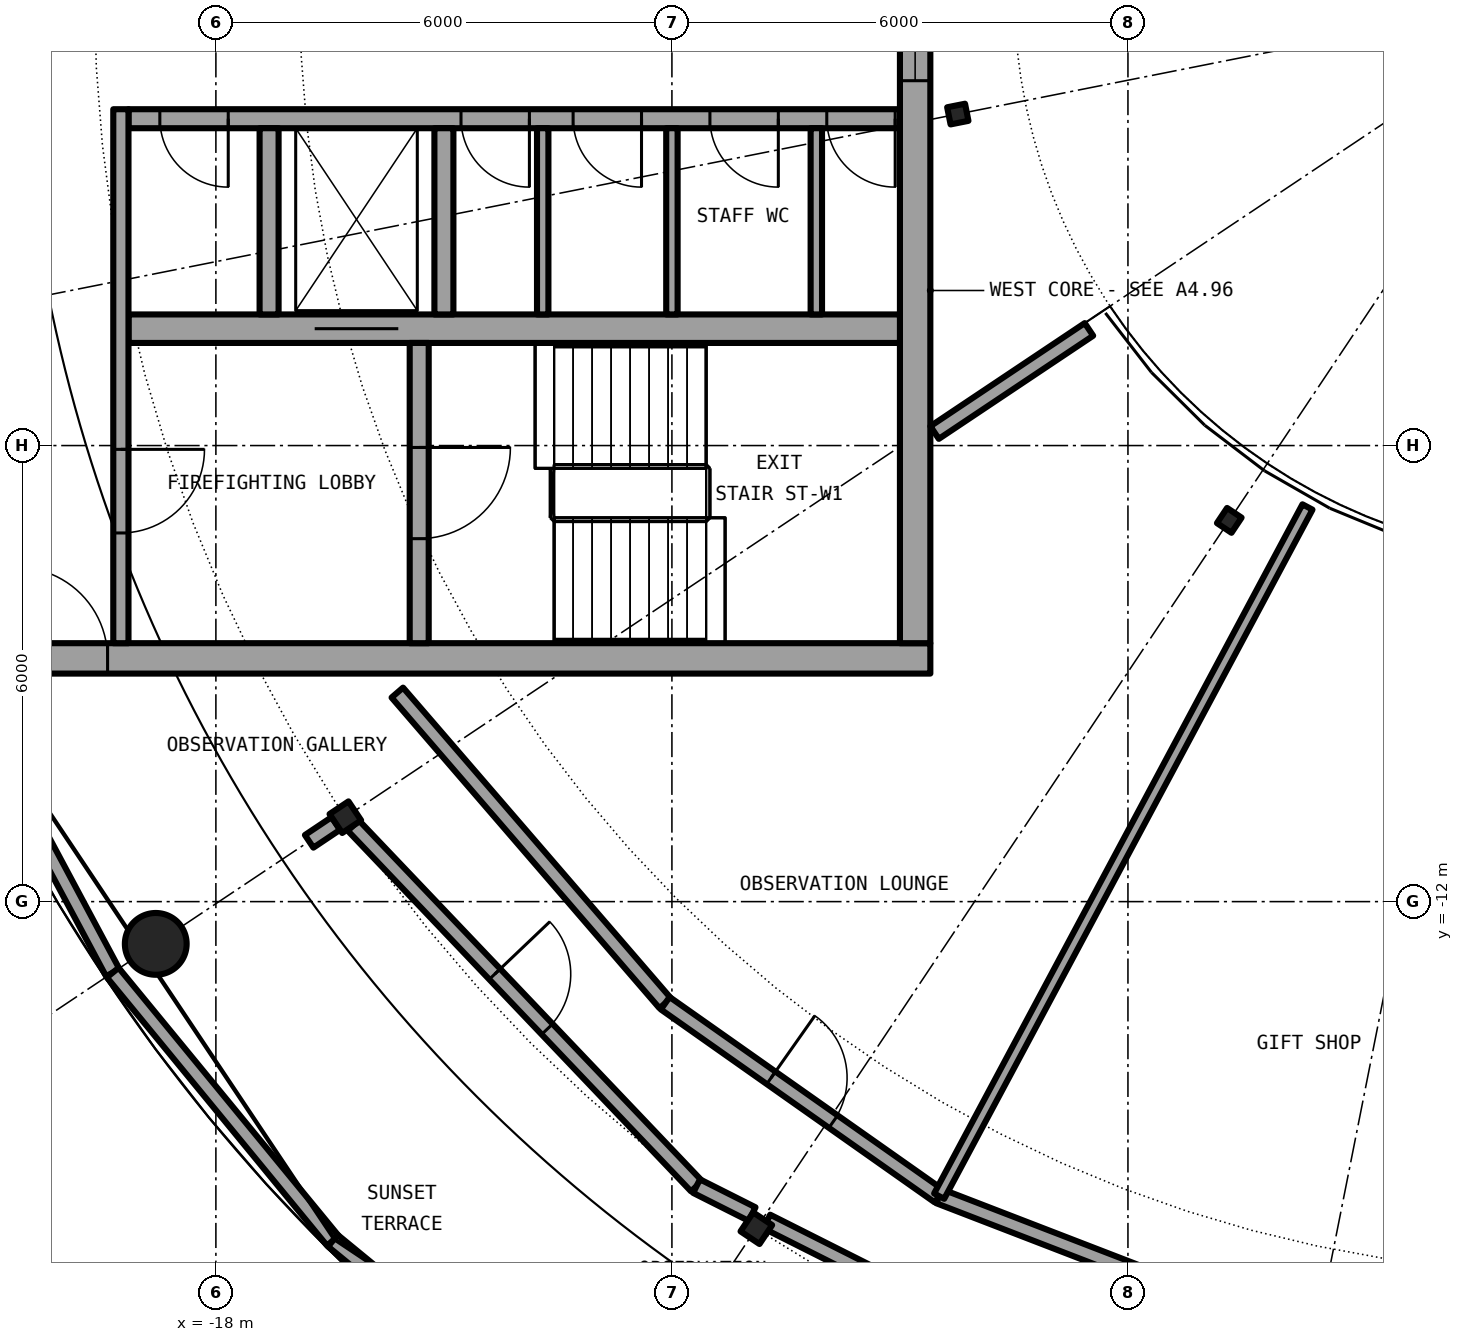
"""IFC4 building model, lengths in metres.
Left out: names, types, materials, properties, quantities, classifications, styles, units other than length and angle.
Written with IfcOpenShell. Run it as: python <this file> out.ifc"""

import sys

from ifc_helpers import new_model, si_unit, direction, frame, frame_2d, origin, origin_2d, place, context, subcontext, project, spatial, rectangle, hollow_circle, i_section, extrude, element, fill, save


model = new_model("IFC4")
c1 = context("Model", 3, precision=1e-05, world=origin(), true_north=direction((0.0, 1.0)))
c2 = subcontext(c1, "Body", "Model", "MODEL_VIEW")
j1 = project(units=[si_unit("LENGTHUNIT", "METRE"), si_unit("PLANEANGLEUNIT", "RADIAN")], contexts=[c1])
p1 = place(None, origin())
s1 = spatial("IfcSite", under=j1, at=p1, CompositionType="ELEMENT")
p2 = place(p1, origin())
s2 = spatial("IfcBuilding", under=s1, at=p2, CompositionType="ELEMENT")
p3 = place(p2, frame((0.0, 0.0, 255.4)))
s3 = spatial("IfcBuildingStorey", under=s2, at=p3, CompositionType="ELEMENT", Elevation=255.4)
p4 = place(p3, frame((-18.791, -12.556, 0.0), z_axis=(0.0, 0.0, 1.0), x_axis=(1.0, 0.0, 0.0)))
e1 = element("IfcColumn", 1, at=p4, inside=s3, PredefinedType="COLUMN", context=c2, shape_type="SweptSolid", body=[
    extrude(hollow_circle(Radius=0.406, WallThickness=0.03, at=origin_2d()), origin(), (0.0, 0.0, 1.0), 6.1),
])
for number, where, z_axis, x_axis in (
    (2, (-16.297, -10.889, 0.0), (0.0, 0.0, 1.0), (-0.831, -0.556, 0.0)),
    (3, (-10.889, -16.297, 0.0), (0.0, 0.0, 1.0), (-0.556, -0.831, 0.0)),
):
    element("IfcColumn", number, at=place(p3, frame(where, z_axis=z_axis, x_axis=x_axis)), inside=s3, PredefinedType="COLUMN", context=c2, shape_type="SweptSolid", body=[
        extrude(i_section(OverallWidth=0.3, OverallDepth=0.3, WebThickness=0.011, FlangeThickness=0.019, FilletRadius=0.027, at=origin_2d()), origin(), (0.0, 0.0, 1.0), 6.1),
    ])
for number, where, z_axis, x_axis in (
    (4, (-8.239, -1.639, 0.0), (0.0, 0.0, 1.0), (-0.981, -0.195, 0.0)),
    (5, (-4.667, -6.984, 0.0), (0.0, 0.0, 1.0), (-0.556, -0.831, 0.0)),
):
    element("IfcColumn", number, at=place(p3, frame(where, z_axis=z_axis, x_axis=x_axis)), inside=s3, PredefinedType="COLUMN", context=c2, shape_type="SweptSolid", body=[
        extrude(i_section(OverallWidth=0.24, OverallDepth=0.23, WebThickness=0.008, FlangeThickness=0.012, FilletRadius=0.021, at=origin_2d()), origin(), (0.0, 0.0, 1.0), 6.1),
    ])
p5 = place(p3, frame((-21.508, -8.909, 6.1), z_axis=(0.0, 0.0, 1.0), x_axis=(0.471334945511, -0.881954289711, 0.0)))
e6 = element("IfcWall", 6, at=p5, inside=s3, PredefinedType="PARAPET", context=c2, shape_type="SweptSolid", body=[
    extrude(rectangle(XDim=4.564, YDim=0.2, at=frame_2d((2.282, 0.0))), origin(), (0.0, 0.0, 1.0), 1.1),
])
for number, where, z_axis, x_axis in (
    (7, (-19.357, -12.934, 6.1), (0.0, 0.0, 1.0), (0.635, -0.773, 0.0)),
    (8, (-16.461, -16.461, 6.1), (0.0, 0.0, 1.0), (0.773, -0.635, 0.0)),
):
    element("IfcWall", number, at=place(p3, frame(where, z_axis=z_axis, x_axis=x_axis)), inside=s3, PredefinedType="PARAPET", context=c2, shape_type="SweptSolid", body=[
        extrude(rectangle(XDim=4.563, YDim=0.2, at=frame_2d((2.282, 0.0))), origin(), (0.0, 0.0, 1.0), 1.1),
    ])
p6 = place(p3, frame((-21.1, -8.8, 0.0), z_axis=(0.0, 0.0, 1.0), x_axis=(1.0, 0.0, 0.0)))
e9 = element("IfcWall", 9, at=p6, inside=s3, PredefinedType="SHEAR", context=c2, shape_type="SweptSolid", body=[
    extrude(rectangle(XDim=12.5, YDim=0.4, at=frame_2d((6.25, 0.0))), origin(), (0.0, 0.0, 1.0), 6.1),
])
p7 = place(p6, frame((0.475, 0.0, 0.0)))
e10 = element("IfcOpeningElement", 10, at=p7, cuts=e9, PredefinedType="OPENING", context=c2, shape_type="SweptSolid", body=[
    extrude(rectangle(XDim=1.2, YDim=2.3, at=frame_2d((0.6, 1.15))), frame((0.0, 0.21, 0.0), z_axis=(0.0, -1.0, 0.0), x_axis=(1.0, 0.0, 0.0)), (0.0, 0.0, 1.0), 0.42),
])
p8 = place(p3, frame((-8.8, 8.6, 0.0), z_axis=(0.0, 0.0, 1.0), x_axis=(0.0, -1.0, 0.0)))
e11 = element("IfcWall", 11, at=p8, inside=s3, PredefinedType="SHEAR", context=c2, shape_type="SweptSolid", body=[
    extrude(rectangle(XDim=17.2, YDim=0.4, at=frame_2d((8.6, 0.0))), origin(), (0.0, 0.0, 1.0), 6.1),
])
p9 = place(p8, frame((7.4, 0.0, 0.1)))
e12 = element("IfcOpeningElement", 12, at=p9, cuts=e11, PredefinedType="OPENING", context=c2, shape_type="SweptSolid", body=[
    extrude(rectangle(XDim=2.4, YDim=2.2, at=frame_2d((1.2, 1.1))), frame((0.0, 0.21, 0.0), z_axis=(0.0, -1.0, 0.0), x_axis=(1.0, 0.0, 0.0)), (0.0, 0.0, 1.0), 0.42),
])
p10 = place(p3, frame((-9.0, -1.7, 0.0), z_axis=(0.0, 0.0, 1.0), x_axis=(-1.0, 0.0, 0.0)))
e13 = element("IfcWall", 13, at=p10, inside=s3, PredefinedType="SHEAR", context=c2, shape_type="SweptSolid", body=[
    extrude(rectangle(XDim=10.15, YDim=0.25, at=frame_2d((5.075, 0.0))), origin(), (0.0, 0.0, 1.0), 6.1),
])
p11 = place(p10, frame((0.062, 0.0, 0.0)))
e14 = element("IfcOpeningElement", 14, at=p11, cuts=e13, PredefinedType="OPENING", context=c2, shape_type="SweptSolid", body=[
    extrude(rectangle(XDim=0.9, YDim=2.3, at=frame_2d((0.45, 1.15))), frame((0.0, 0.135, 0.0), z_axis=(0.0, -1.0, 0.0), x_axis=(1.0, 0.0, 0.0)), (0.0, 0.0, 1.0), 0.27),
])
p12 = place(p10, frame((1.6, 0.0, 0.0)))
e15 = element("IfcOpeningElement", 15, at=p12, cuts=e13, PredefinedType="OPENING", context=c2, shape_type="SweptSolid", body=[
    extrude(rectangle(XDim=0.9, YDim=2.3, at=frame_2d((0.45, 1.15))), frame((0.0, 0.135, 0.0), z_axis=(0.0, -1.0, 0.0), x_axis=(1.0, 0.0, 0.0)), (0.0, 0.0, 1.0), 0.27),
])
p13 = place(p10, frame((3.4, 0.0, 0.0)))
e16 = element("IfcOpeningElement", 16, at=p13, cuts=e13, PredefinedType="OPENING", context=c2, shape_type="SweptSolid", body=[
    extrude(rectangle(XDim=0.9, YDim=2.3, at=frame_2d((0.45, 1.15))), frame((0.0, 0.135, 0.0), z_axis=(0.0, -1.0, 0.0), x_axis=(1.0, 0.0, 0.0)), (0.0, 0.0, 1.0), 0.27),
])
p14 = place(p10, frame((4.875, 0.0, 0.0)))
e17 = element("IfcOpeningElement", 17, at=p14, cuts=e13, PredefinedType="OPENING", context=c2, shape_type="SweptSolid", body=[
    extrude(rectangle(XDim=0.9, YDim=2.3, at=frame_2d((0.45, 1.15))), frame((0.0, 0.135, 0.0), z_axis=(0.0, -1.0, 0.0), x_axis=(1.0, 0.0, 0.0)), (0.0, 0.0, 1.0), 0.27),
])
p15 = place(p10, frame((8.837, 0.0, 0.0)))
e18 = element("IfcOpeningElement", 18, at=p15, cuts=e13, PredefinedType="OPENING", context=c2, shape_type="SweptSolid", body=[
    extrude(rectangle(XDim=0.9, YDim=2.3, at=frame_2d((0.45, 1.15))), frame((0.0, 0.135, 0.0), z_axis=(0.0, -1.0, 0.0), x_axis=(1.0, 0.0, 0.0)), (0.0, 0.0, 1.0), 0.27),
])
p16 = place(p3, frame((-9.0, -4.462, 0.0), z_axis=(0.0, 0.0, 1.0), x_axis=(-1.0, 0.0, 0.0)))
e19 = element("IfcWall", 19, at=p16, inside=s3, PredefinedType="SHEAR", context=c2, shape_type="SweptSolid", body=[
    extrude(rectangle(XDim=10.15, YDim=0.375, at=frame_2d((5.075, 0.0))), origin(), (0.0, 0.0, 1.0), 6.1),
])
p17 = place(p16, frame((6.6, 0.0, 0.0)))
e20 = element("IfcOpeningElement", 20, at=p17, cuts=e19, PredefinedType="OPENING", context=c2, shape_type="SweptSolid", body=[
    extrude(rectangle(XDim=1.1, YDim=2.3, at=frame_2d((0.55, 1.15))), frame((0.0, 0.198, 0.0), z_axis=(0.0, -1.0, 0.0), x_axis=(1.0, 0.0, 0.0)), (0.0, 0.0, 1.0), 0.395),
])
p18 = place(p3, frame((-15.325, -4.65, 0.0), z_axis=(0.0, 0.0, 1.0), x_axis=(0.0, -1.0, 0.0)))
e21 = element("IfcWall", 21, at=p18, inside=s3, PredefinedType="SHEAR", context=c2, shape_type="SweptSolid", body=[
    extrude(rectangle(XDim=3.95, YDim=0.25, at=frame_2d((1.975, 0.0))), origin(), (0.0, 0.0, 1.0), 6.1),
])
p19 = place(p18, frame((1.375, 0.0, 0.0)))
e22 = element("IfcOpeningElement", 22, at=p19, cuts=e21, PredefinedType="OPENING", context=c2, shape_type="SweptSolid", body=[
    extrude(rectangle(XDim=1.2, YDim=2.3, at=frame_2d((0.6, 1.15))), frame((0.0, 0.135, 0.0), z_axis=(0.0, -1.0, 0.0), x_axis=(1.0, 0.0, 0.0)), (0.0, 0.0, 1.0), 0.27),
])
for number, where, z_axis, x_axis in (
    (23, (-15.0, -1.825, 0.0), (0.0, 0.0, 1.0), (0.0, -1.0, 0.0)),
    (24, (-17.3, -1.825, 0.0), (0.0, 0.0, 1.0), (0.0, -1.0, 0.0)),
):
    element("IfcWall", number, at=place(p3, frame(where, z_axis=z_axis, x_axis=x_axis)), inside=s3, PredefinedType="SOLIDWALL", context=c2, shape_type="SweptSolid", body=[
        extrude(rectangle(XDim=2.45, YDim=0.25, at=frame_2d((1.225, 0.0))), origin(), (0.0, 0.0, 1.0), 5.75),
    ])
p20 = place(p3, frame((-19.25, -1.575, 0.0), z_axis=(0.0, 0.0, 1.0), x_axis=(0.0, -1.0, 0.0)))
e25 = element("IfcWall", 25, at=p20, inside=s3, PredefinedType="SOLIDWALL", context=c2, shape_type="SweptSolid", body=[
    extrude(rectangle(XDim=7.025, YDim=0.2, at=frame_2d((3.513, 0.0))), origin(), (0.0, 0.0, 1.0), 5.75),
])
p21 = place(p20, frame((4.475, 0.0, 0.0)))
e26 = element("IfcOpeningElement", 26, at=p21, cuts=e25, PredefinedType="OPENING", context=c2, shape_type="SweptSolid", body=[
    extrude(rectangle(XDim=1.1, YDim=2.3, at=frame_2d((0.55, 1.15))), frame((0.0, 0.11, 0.0), z_axis=(0.0, -1.0, 0.0), x_axis=(1.0, 0.0, 0.0)), (0.0, 0.0, 1.0), 0.22),
])
for number, where, z_axis, x_axis in (
    (27, (-10.1, -1.825, 0.0), (0.0, 0.0, 1.0), (0.0, -1.0, 0.0)),
    (28, (-12.0, -1.825, 0.0), (0.0, 0.0, 1.0), (0.0, -1.0, 0.0)),
    (29, (-13.7, -1.825, 0.0), (0.0, 0.0, 1.0), (0.0, -1.0, 0.0)),
):
    element("IfcWall", number, at=place(p3, frame(where, z_axis=z_axis, x_axis=x_axis)), inside=s3, PredefinedType="PARTITIONING", context=c2, shape_type="SweptSolid", body=[
        extrude(rectangle(XDim=2.45, YDim=0.15, at=frame_2d((1.225, 0.0))), origin(), (0.0, 0.0, 1.0), 5.75),
    ])
p22 = place(p3, frame((-16.192, -10.999, 0.0), z_axis=(0.0, 0.0, 1.0), x_axis=(0.689484820725, -0.724300132535, 0.0)))
e30 = element("IfcWall", 30, at=p22, inside=s3, PredefinedType="PARTITIONING", context=c2, shape_type="SweptSolid", body=[
    extrude(rectangle(XDim=6.55, YDim=0.2, at=frame_2d((3.275, 0.0))), origin(), (0.0, 0.0, 1.0), 5.5),
])
p23 = place(p22, frame((2.699, 0.0, 0.0)))
e31 = element("IfcOpeningElement", 31, at=p23, cuts=e30, PredefinedType="OPENING", context=c2, shape_type="SweptSolid", body=[
    extrude(rectangle(XDim=1.0, YDim=2.3, at=frame_2d((0.5, 1.15))), frame((0.0, 0.11, 0.0), z_axis=(0.0, -1.0, 0.0), x_axis=(1.0, 0.0, 0.0)), (0.0, 0.0, 1.0), 0.22),
])
p24 = place(p3, frame((-11.676, -15.743, 0.0), z_axis=(0.0, 0.0, 1.0), x_axis=(0.893110817984, -0.449836711263, 0.0)))
e32 = element("IfcWall", 32, at=p24, inside=s3, PredefinedType="PARTITIONING", context=c2, shape_type="SweptSolid", body=[
    extrude(rectangle(XDim=0.818, YDim=0.2, at=frame_2d((0.409, 0.0))), origin(), (0.0, 0.0, 1.0), 5.75),
])
p25 = place(p3, frame((-10.752, -16.208, 0.0), z_axis=(0.0, 0.0, 1.0), x_axis=(0.89321770158, -0.449624440599, 0.0)))
e33 = element("IfcWall", 33, at=p25, inside=s3, PredefinedType="PARTITIONING", context=c2, shape_type="SweptSolid", body=[
    extrude(rectangle(XDim=5.667, YDim=0.2, at=frame_2d((2.833, 0.0))), origin(), (0.0, 0.0, 1.0), 5.5),
])
p26 = place(p3, frame((-8.485, -15.875, 0.0), z_axis=(0.0, 0.0, 1.0), x_axis=(0.932983851272, -0.35991823136, 0.0)))
e34 = element("IfcWall", 34, at=p26, inside=s3, PredefinedType="PARTITIONING", context=c2, shape_type="SweptSolid", body=[
    extrude(rectangle(XDim=4.406, YDim=0.2, at=frame_2d((2.203, 0.0))), origin(), (0.0, 0.0, 1.0), 5.75),
])
p27 = place(p3, frame((-15.613, -9.25, 0.0), z_axis=(0.0, 0.0, 1.0), x_axis=(0.653146301984, -0.757231740093, 0.0)))
e35 = element("IfcWall", 35, at=p27, inside=s3, PredefinedType="PARTITIONING", context=c2, shape_type="SweptSolid", body=[
    extrude(rectangle(XDim=5.397, YDim=0.2, at=frame_2d((2.699, 0.0))), origin(), (0.0, 0.0, 1.0), 5.75),
])
p28 = place(p3, frame((-12.088, -13.337, 0.0), z_axis=(0.0, 0.0, 1.0), x_axis=(0.817507922666, -0.575917352038, 0.0)))
e36 = element("IfcWall", 36, at=p28, inside=s3, PredefinedType="PARTITIONING", context=c2, shape_type="SweptSolid", body=[
    extrude(rectangle(XDim=4.407, YDim=0.2, at=frame_2d((2.204, 0.0))), origin(), (0.0, 0.0, 1.0), 5.75),
])
p29 = place(p28, frame((1.704, 0.0, 0.0)))
e37 = element("IfcOpeningElement", 37, at=p29, cuts=e36, PredefinedType="OPENING", context=c2, shape_type="SweptSolid", body=[
    extrude(rectangle(XDim=1.0, YDim=2.3, at=frame_2d((0.5, 1.15))), frame((0.0, 0.11, 0.0), z_axis=(0.0, -1.0, 0.0), x_axis=(1.0, 0.0, 0.0)), (0.0, 0.0, 1.0), 0.22),
])
p30 = place(p3, frame((-6.513, -4.472, 0.0), z_axis=(0.0, 0.0, 1.0), x_axis=(-0.831450132577, -0.555599385382, 0.0)))
e38 = element("IfcWall", 38, at=p30, inside=s3, PredefinedType="PARTITIONING", context=c2, shape_type="SweptSolid", body=[
    extrude(rectangle(XDim=2.443, YDim=0.2, at=frame_2d((1.221, 0.0))), origin(), (0.0, 0.0, 1.0), 5.75),
])
p31 = place(p3, frame((-16.773, -11.207, 0.0), z_axis=(0.0, 0.0, 1.0), x_axis=(0.830713836596, 0.556699669201, 0.0)))
e39 = element("IfcWall", 39, at=p31, inside=s3, PredefinedType="PARTITIONING", context=c2, shape_type="SweptSolid", body=[
    extrude(rectangle(XDim=0.422, YDim=0.2, at=frame_2d((0.211, 0.0))), origin(), (0.0, 0.0, 1.0), 5.75),
])
p32 = place(p3, frame((-8.484, -15.875, 0.0), z_axis=(0.0, 0.0, 1.0), x_axis=(0.471365806418, 0.881937796299, 0.0)))
e40 = element("IfcWall", 40, at=p32, inside=s3, PredefinedType="PARTITIONING", context=c2, shape_type="SweptSolid", body=[
    extrude(rectangle(XDim=10.281, YDim=0.15, at=frame_2d((5.14, 0.0))), origin(), (0.0, 0.0, 1.0), 5.75),
])
p33 = place(p17, origin())
e41 = element("IfcDoor", 41, at=p33, inside=s3, OperationType="DOUBLE_DOOR_SLIDING", PredefinedType="DOOR", context=c2, shape_type="SweptSolid", body=[
    extrude(rectangle(XDim=1.1, YDim=2.3, at=frame_2d((0.55, 1.15))), frame((0.0, 0.025, 0.0), z_axis=(0.0, -1.0, 0.0), x_axis=(1.0, 0.0, 0.0)), (0.0, 0.0, 1.0), 0.05),
])
fill(e20, e41)
p34 = place(p11, origin())
e42 = element("IfcDoor", 42, at=p34, inside=s3, OperationType="SINGLE_SWING_RIGHT", PredefinedType="DOOR", context=c2, shape_type="SweptSolid", body=[
    extrude(rectangle(XDim=0.9, YDim=2.3, at=frame_2d((0.45, 1.15))), frame((0.0, 0.025, 0.0), z_axis=(0.0, -1.0, 0.0), x_axis=(1.0, 0.0, 0.0)), (0.0, 0.0, 1.0), 0.05),
])
fill(e14, e42)
p35 = place(p12, origin())
e43 = element("IfcDoor", 43, at=p35, inside=s3, OperationType="SINGLE_SWING_RIGHT", PredefinedType="DOOR", context=c2, shape_type="SweptSolid", body=[
    extrude(rectangle(XDim=0.9, YDim=2.3, at=frame_2d((0.45, 1.15))), frame((0.0, 0.025, 0.0), z_axis=(0.0, -1.0, 0.0), x_axis=(1.0, 0.0, 0.0)), (0.0, 0.0, 1.0), 0.05),
])
fill(e15, e43)
p36 = place(p13, origin())
e44 = element("IfcDoor", 44, at=p36, inside=s3, OperationType="SINGLE_SWING_RIGHT", PredefinedType="DOOR", context=c2, shape_type="SweptSolid", body=[
    extrude(rectangle(XDim=0.9, YDim=2.3, at=frame_2d((0.45, 1.15))), frame((0.0, 0.025, 0.0), z_axis=(0.0, -1.0, 0.0), x_axis=(1.0, 0.0, 0.0)), (0.0, 0.0, 1.0), 0.05),
])
fill(e16, e44)
p37 = place(p14, origin())
e45 = element("IfcDoor", 45, at=p37, inside=s3, OperationType="SINGLE_SWING_LEFT", PredefinedType="DOOR", context=c2, shape_type="SweptSolid", body=[
    extrude(rectangle(XDim=0.9, YDim=2.3, at=frame_2d((0.45, 1.15))), frame((0.0, 0.025, 0.0), z_axis=(0.0, -1.0, 0.0), x_axis=(1.0, 0.0, 0.0)), (0.0, 0.0, 1.0), 0.05),
])
fill(e17, e45)
p38 = place(p15, origin())
e46 = element("IfcDoor", 46, at=p38, inside=s3, OperationType="SINGLE_SWING_LEFT", PredefinedType="DOOR", context=c2, shape_type="SweptSolid", body=[
    extrude(rectangle(XDim=0.9, YDim=2.3, at=frame_2d((0.45, 1.15))), frame((0.0, 0.025, 0.0), z_axis=(0.0, -1.0, 0.0), x_axis=(1.0, 0.0, 0.0)), (0.0, 0.0, 1.0), 0.05),
])
fill(e18, e46)
p39 = place(p19, origin())
e47 = element("IfcDoor", 47, at=p39, inside=s3, OperationType="SINGLE_SWING_LEFT", PredefinedType="DOOR", context=c2, shape_type="SweptSolid", body=[
    extrude(rectangle(XDim=1.2, YDim=2.3, at=frame_2d((0.6, 1.15))), frame((0.0, 0.025, 0.0), z_axis=(0.0, -1.0, 0.0), x_axis=(1.0, 0.0, 0.0)), (0.0, 0.0, 1.0), 0.05),
])
fill(e22, e47)
p40 = place(p21, origin())
e48 = element("IfcDoor", 48, at=p40, inside=s3, OperationType="SINGLE_SWING_LEFT", PredefinedType="DOOR", context=c2, shape_type="SweptSolid", body=[
    extrude(rectangle(XDim=1.1, YDim=2.3, at=frame_2d((0.55, 1.15))), frame((0.0, 0.025, 0.0), z_axis=(0.0, -1.0, 0.0), x_axis=(1.0, 0.0, 0.0)), (0.0, 0.0, 1.0), 0.05),
])
fill(e26, e48)
p41 = place(p7, origin())
e49 = element("IfcDoor", 49, at=p41, inside=s3, OperationType="SINGLE_SWING_RIGHT", PredefinedType="DOOR", context=c2, shape_type="SweptSolid", body=[
    extrude(rectangle(XDim=1.2, YDim=2.3, at=frame_2d((0.6, 1.15))), frame((0.0, 0.025, 0.0), z_axis=(0.0, -1.0, 0.0), x_axis=(1.0, 0.0, 0.0)), (0.0, 0.0, 1.0), 0.05),
])
fill(e10, e49)
p42 = place(p9, origin())
e50 = element("IfcWindow", 50, at=p42, inside=s3, PartitioningType="SINGLE_PANEL", PredefinedType="WINDOW", context=c2, shape_type="SweptSolid", body=[
    extrude(rectangle(XDim=2.4, YDim=2.2, at=frame_2d((1.2, 1.1))), frame((0.0, 0.03, 0.0), z_axis=(0.0, -1.0, 0.0), x_axis=(1.0, 0.0, 0.0)), (0.0, 0.0, 1.0), 0.06),
])
fill(e12, e50)
p43 = place(p23, origin())
e51 = element("IfcDoor", 51, at=p43, inside=s3, OperationType="SINGLE_SWING_LEFT", PredefinedType="DOOR", context=c2, shape_type="SweptSolid", body=[
    extrude(rectangle(XDim=1.0, YDim=2.3, at=frame_2d((0.5, 1.15))), frame((0.0, 0.025, 0.0), z_axis=(0.0, -1.0, 0.0), x_axis=(1.0, 0.0, 0.0)), (0.0, 0.0, 1.0), 0.05),
])
fill(e31, e51)
p44 = place(p29, origin())
e52 = element("IfcDoor", 52, at=p44, inside=s3, OperationType="SINGLE_SWING_RIGHT", PredefinedType="DOOR", context=c2, shape_type="SweptSolid", body=[
    extrude(rectangle(XDim=1.0, YDim=2.3, at=frame_2d((0.5, 1.15))), frame((0.0, 0.025, 0.0), z_axis=(0.0, -1.0, 0.0), x_axis=(1.0, 0.0, 0.0)), (0.0, 0.0, 1.0), 0.05),
])
fill(e37, e52)
save(model, sys.argv[1])
